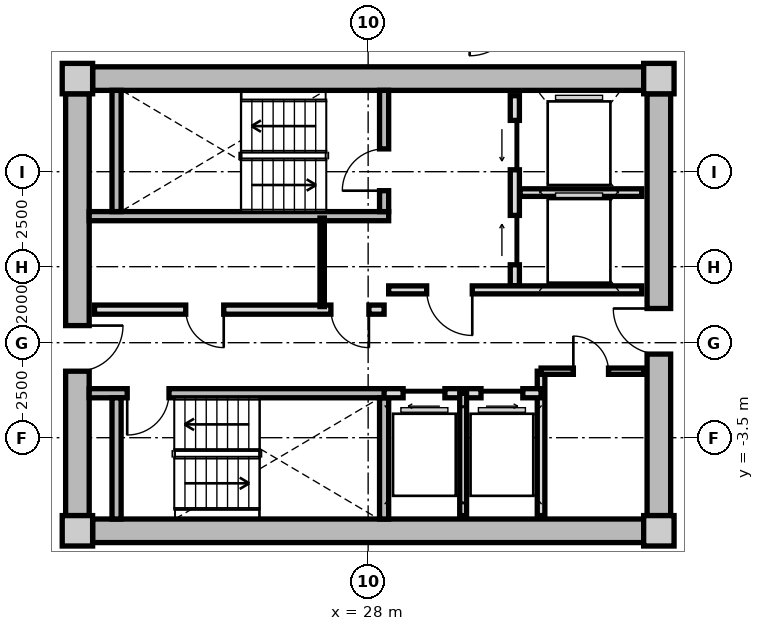
"""IFC4 building model, lengths in metres.
Left out: names, types, materials, properties, quantities, classifications, styles, units other than length and angle.
Written with IfcOpenShell. Run it as: python <this file> out.ifc"""

import sys

from ifc_helpers import new_model, si_unit, direction, frame, frame_2d, origin, origin_2d, place, context, subcontext, project, spatial, rectangle, extrude, source, transform, mapped, element, fill, save


model = new_model("IFC4")
c1 = context("Model", 3, precision=1e-05, world=origin(), true_north=direction((0.0, 1.0)))
c2 = subcontext(c1, "Body", "Model", "MODEL_VIEW")
j1 = project(units=[si_unit("LENGTHUNIT", "METRE"), si_unit("PLANEANGLEUNIT", "RADIAN")], contexts=[c1])
p1 = place(None, origin())
s1 = spatial("IfcSite", under=j1, at=p1, CompositionType="ELEMENT")
p2 = place(p1, origin())
s2 = spatial("IfcBuilding", under=s1, at=p2, CompositionType="ELEMENT")
p3 = place(p2, frame((0.0, 0.0, 155.65)))
s3 = spatial("IfcBuildingStorey", under=s2, at=p3, CompositionType="ELEMENT", Elevation=155.65)
m1 = source(origin(), c2, "Body", "SweptSolid", [
    extrude(rectangle(XDim=0.8, YDim=0.8, at=origin_2d()), origin(), (0.0, 0.0, 1.0), 3.05),
])
for number, where, z_axis, x_axis in (
    (1, (20.35, -5.95, 0.0), (0.0, 0.0, 1.0), (1.0, 0.0, 0.0)),
    (2, (35.65, -5.95, 0.0), (0.0, 0.0, 1.0), (1.0, 0.0, 0.0)),
    (3, (35.65, 5.95, 0.0), (0.0, 0.0, 1.0), (1.0, 0.0, 0.0)),
    (4, (20.35, 5.95, 0.0), (0.0, 0.0, 1.0), (1.0, 0.0, 0.0)),
):
    element("IfcColumn", number, at=place(p3, frame(where, z_axis=z_axis, x_axis=x_axis)), inside=s3, PredefinedType="COLUMN", context=c2, shape_type="MappedRepresentation", body=[
        mapped(m1, transform((0.0, 0.0, 0.0), x_axis=(1.0, 0.0, 0.0), y_axis=(0.0, 1.0, 0.0), z_axis=(0.0, 0.0, 1.0), scale=1.0)),
    ])
m2 = source(origin(), c2, "Body", "SweptSolid", [
    extrude(rectangle(XDim=14.5, YDim=0.62, at=frame_2d((7.25, 0.0))), origin(), (0.0, 0.0, 1.0), 2.81),
])
for number, where, z_axis, x_axis in (
    (5, (20.75, 5.95, 0.0), (0.0, 0.0, 1.0), (1.0, 0.0, 0.0)),
    (6, (35.25, -5.95, 0.0), (0.0, 0.0, 1.0), (-1.0, 0.0, 0.0)),
):
    element("IfcWall", number, at=place(p3, frame(where, z_axis=z_axis, x_axis=x_axis)), inside=s3, PredefinedType="SHEAR", context=c2, shape_type="MappedRepresentation", body=[
        mapped(m2, transform((0.0, 0.0, 0.0), x_axis=(1.0, 0.0, 0.0), y_axis=(0.0, 1.0, 0.0), z_axis=(0.0, 0.0, 1.0), scale=1.0)),
    ])
m3 = source(origin(), c2, "Body", "SweptSolid", [
    extrude(rectangle(XDim=11.1, YDim=0.62, at=frame_2d((5.55, 0.0))), origin(), (0.0, 0.0, 1.0), 2.81),
])
p4 = place(p3, frame((20.35, -5.55, 0.0), z_axis=(0.0, 0.0, 1.0), x_axis=(0.0, 1.0, 0.0)))
e7 = element("IfcWall", 7, at=p4, inside=s3, PredefinedType="SHEAR", context=c2, shape_type="MappedRepresentation", body=[
    mapped(m3, transform((0.0, 0.0, 0.0), x_axis=(1.0, 0.0, 0.0), y_axis=(0.0, 1.0, 0.0), z_axis=(0.0, 0.0, 1.0), scale=1.0)),
])
p5 = place(p4, frame((3.8, 0.0, 0.0)))
e8 = element("IfcOpeningElement", 8, at=p5, cuts=e7, PredefinedType="OPENING", context=c2, shape_type="SweptSolid", body=[
    extrude(rectangle(XDim=1.2, YDim=2.15, at=frame_2d((0.6, 1.075))), frame((0.0, 0.32, 0.0), z_axis=(0.0, -1.0, 0.0), x_axis=(1.0, 0.0, 0.0)), (0.0, 0.0, 1.0), 0.64),
])
p6 = place(p3, frame((35.65, 5.55, 0.0), z_axis=(0.0, 0.0, 1.0), x_axis=(0.0, -1.0, 0.0)))
e9 = element("IfcWall", 9, at=p6, inside=s3, PredefinedType="SHEAR", context=c2, shape_type="MappedRepresentation", body=[
    mapped(m3, transform((0.0, 0.0, 0.0), x_axis=(1.0, 0.0, 0.0), y_axis=(0.0, 1.0, 0.0), z_axis=(0.0, 0.0, 1.0), scale=1.0)),
])
p7 = place(p6, frame((5.65, 0.0, 0.0)))
e10 = element("IfcOpeningElement", 10, at=p7, cuts=e9, PredefinedType="OPENING", context=c2, shape_type="SweptSolid", body=[
    extrude(rectangle(XDim=1.2, YDim=2.15, at=frame_2d((0.6, 1.075))), frame((0.0, 0.32, 0.0), z_axis=(0.0, -1.0, 0.0), x_axis=(1.0, 0.0, 0.0)), (0.0, 0.0, 1.0), 0.64),
])
m4 = source(origin(), c2, "Body", "SweptSolid", [
    extrude(rectangle(XDim=7.88, YDim=0.24, at=frame_2d((3.94, 0.0))), origin(), (0.0, 0.0, 1.0), 2.81),
])
p8 = place(p3, frame((20.66, 2.33, 0.0), z_axis=(0.0, 0.0, 1.0), x_axis=(1.0, 0.0, 0.0)))
e11 = element("IfcWall", 11, at=p8, inside=s3, PredefinedType="PARTITIONING", context=c2, shape_type="MappedRepresentation", body=[
    mapped(m4, transform((0.0, 0.0, 0.0), x_axis=(1.0, 0.0, 0.0), y_axis=(0.0, 1.0, 0.0), z_axis=(0.0, 0.0, 1.0), scale=1.0)),
])
m5 = source(origin(), c2, "Body", "SweptSolid", [
    extrude(rectangle(XDim=3.19, YDim=0.24, at=frame_2d((1.595, 0.0))), origin(), (0.0, 0.0, 1.0), 2.81),
])
p9 = place(p3, frame((21.38, 2.45, 0.0), z_axis=(0.0, 0.0, 1.0), x_axis=(0.0, 1.0, 0.0)))
e12 = element("IfcWall", 12, at=p9, inside=s3, PredefinedType="PARTITIONING", context=c2, shape_type="MappedRepresentation", body=[
    mapped(m5, transform((0.0, 0.0, 0.0), x_axis=(1.0, 0.0, 0.0), y_axis=(0.0, 1.0, 0.0), z_axis=(0.0, 0.0, 1.0), scale=1.0)),
])
p10 = place(p3, frame((28.42, 2.45, 0.0), z_axis=(0.0, 0.0, 1.0), x_axis=(0.0, 1.0, 0.0)))
e13 = element("IfcWall", 13, at=p10, inside=s3, PredefinedType="PARTITIONING", context=c2, shape_type="MappedRepresentation", body=[
    mapped(m5, transform((0.0, 0.0, 0.0), x_axis=(1.0, 0.0, 0.0), y_axis=(0.0, 1.0, 0.0), z_axis=(0.0, 0.0, 1.0), scale=1.0)),
])
p11 = place(p10, frame((0.55, 0.0, 0.0)))
e14 = element("IfcOpeningElement", 14, at=p11, cuts=e13, PredefinedType="OPENING", context=c2, shape_type="SweptSolid", body=[
    extrude(rectangle(XDim=1.1, YDim=2.15, at=frame_2d((0.55, 1.075))), frame((0.0, 0.13, 0.0), z_axis=(0.0, -1.0, 0.0), x_axis=(1.0, 0.0, 0.0)), (0.0, 0.0, 1.0), 0.26),
])
p12 = place(p3, frame((20.66, -2.33, 0.0), z_axis=(0.0, 0.0, 1.0), x_axis=(1.0, 0.0, 0.0)))
e15 = element("IfcWall", 15, at=p12, inside=s3, PredefinedType="PARTITIONING", context=c2, shape_type="MappedRepresentation", body=[
    mapped(m4, transform((0.0, 0.0, 0.0), x_axis=(1.0, 0.0, 0.0), y_axis=(0.0, 1.0, 0.0), z_axis=(0.0, 0.0, 1.0), scale=1.0)),
])
p13 = place(p12, frame((1.0, 0.0, 0.0)))
e16 = element("IfcOpeningElement", 16, at=p13, cuts=e15, PredefinedType="OPENING", context=c2, shape_type="SweptSolid", body=[
    extrude(rectangle(XDim=1.1, YDim=2.15, at=frame_2d((0.55, 1.075))), frame((0.0, 0.13, 0.0), z_axis=(0.0, -1.0, 0.0), x_axis=(1.0, 0.0, 0.0)), (0.0, 0.0, 1.0), 0.26),
])
for number, where, z_axis, x_axis in (
    (17, (21.38, -5.64, 0.0), (0.0, 0.0, 1.0), (0.0, 1.0, 0.0)),
    (18, (28.42, -5.64, 0.0), (0.0, 0.0, 1.0), (0.0, 1.0, 0.0)),
):
    element("IfcWall", number, at=place(p3, frame(where, z_axis=z_axis, x_axis=x_axis)), inside=s3, PredefinedType="PARTITIONING", context=c2, shape_type="MappedRepresentation", body=[
        mapped(m5, transform((0.0, 0.0, 0.0), x_axis=(1.0, 0.0, 0.0), y_axis=(0.0, 1.0, 0.0), z_axis=(0.0, 0.0, 1.0), scale=1.0)),
    ])
m6 = source(origin(), c2, "Body", "SweptSolid", [
    extrude(rectangle(XDim=5.0, YDim=0.24, at=frame_2d((2.5, 0.0))), origin(), (0.0, 0.0, 1.0), 2.795),
])
p14 = place(p3, frame((31.86, 0.5, 0.0), z_axis=(0.0, 0.0, 1.0), x_axis=(0.0, 1.0, 0.0)))
e19 = element("IfcWall", 19, at=p14, inside=s3, PredefinedType="PARTITIONING", context=c2, shape_type="MappedRepresentation", body=[
    mapped(m6, transform((0.0, 0.0, 0.0), x_axis=(1.0, 0.0, 0.0), y_axis=(0.0, 1.0, 0.0), z_axis=(0.0, 0.0, 1.0), scale=1.0)),
])
p15 = place(p14, frame((3.05, 0.0, 0.0)))
e20 = element("IfcOpeningElement", 20, at=p15, cuts=e19, PredefinedType="OPENING", context=c2, shape_type="SweptSolid", body=[
    extrude(rectangle(XDim=1.3, YDim=2.2, at=frame_2d((0.65, 1.1))), frame((0.0, 0.13, 0.0), z_axis=(0.0, -1.0, 0.0), x_axis=(1.0, 0.0, 0.0)), (0.0, 0.0, 1.0), 0.26),
])
p16 = place(p14, frame((0.55, 0.0, 0.0)))
e21 = element("IfcOpeningElement", 21, at=p16, cuts=e19, PredefinedType="OPENING", context=c2, shape_type="SweptSolid", body=[
    extrude(rectangle(XDim=1.3, YDim=2.2, at=frame_2d((0.65, 1.1))), frame((0.0, 0.13, 0.0), z_axis=(0.0, -1.0, 0.0), x_axis=(1.0, 0.0, 0.0)), (0.0, 0.0, 1.0), 0.26),
])
m7 = source(origin(), c2, "Body", "SweptSolid", [
    extrude(rectangle(XDim=3.2, YDim=0.2, at=frame_2d((1.6, 0.0))), origin(), (0.0, 0.0, 1.0), 2.795),
])
p17 = place(p3, frame((32.0, 2.95, 0.0), z_axis=(0.0, 0.0, 1.0), x_axis=(1.0, 0.0, 0.0)))
e22 = element("IfcWall", 22, at=p17, inside=s3, PredefinedType="PARTITIONING", context=c2, shape_type="MappedRepresentation", body=[
    mapped(m7, transform((0.0, 0.0, 0.0), x_axis=(1.0, 0.0, 0.0), y_axis=(0.0, 1.0, 0.0), z_axis=(0.0, 0.0, 1.0), scale=1.0)),
])
m8 = source(origin(), c2, "Body", "SweptSolid", [
    extrude(rectangle(XDim=6.66, YDim=0.21, at=frame_2d((3.33, 0.0))), origin(), (0.0, 0.0, 1.0), 2.795),
])
p18 = place(p3, frame((28.54, 0.39, 0.0), z_axis=(0.0, 0.0, 1.0), x_axis=(1.0, 0.0, 0.0)))
e23 = element("IfcWall", 23, at=p18, inside=s3, PredefinedType="PARTITIONING", context=c2, shape_type="MappedRepresentation", body=[
    mapped(m8, transform((0.0, 0.0, 0.0), x_axis=(1.0, 0.0, 0.0), y_axis=(0.0, 1.0, 0.0), z_axis=(0.0, 0.0, 1.0), scale=1.0)),
])
p19 = place(p18, frame((1.0, 0.0, 0.0)))
e24 = element("IfcOpeningElement", 24, at=p19, cuts=e23, PredefinedType="OPENING", context=c2, shape_type="SweptSolid", body=[
    extrude(rectangle(XDim=1.2, YDim=2.15, at=frame_2d((0.6, 1.075))), frame((0.0, 0.115, 0.0), z_axis=(0.0, -1.0, 0.0), x_axis=(1.0, 0.0, 0.0)), (0.0, 0.0, 1.0), 0.23),
])
m9 = source(origin(), c2, "Body", "SweptSolid", [
    extrude(rectangle(XDim=7.62, YDim=0.24, at=frame_2d((3.81, 0.0))), origin(), (0.0, 0.0, 1.0), 2.795),
])
p20 = place(p3, frame((20.8, -0.13, 0.0), z_axis=(0.0, 0.0, 1.0), x_axis=(1.0, 0.0, 0.0)))
e25 = element("IfcWall", 25, at=p20, inside=s3, PredefinedType="PARTITIONING", context=c2, shape_type="MappedRepresentation", body=[
    mapped(m9, transform((0.0, 0.0, 0.0), x_axis=(1.0, 0.0, 0.0), y_axis=(0.0, 1.0, 0.0), z_axis=(0.0, 0.0, 1.0), scale=1.0)),
])
p21 = place(p20, frame((6.22, 0.0, 0.0)))
e26 = element("IfcOpeningElement", 26, at=p21, cuts=e25, PredefinedType="OPENING", context=c2, shape_type="SweptSolid", body=[
    extrude(rectangle(XDim=1.0, YDim=2.1, at=frame_2d((0.5, 1.05))), frame((0.0, 0.13, 0.0), z_axis=(0.0, -1.0, 0.0), x_axis=(1.0, 0.0, 0.0)), (0.0, 0.0, 1.0), 0.26),
])
p22 = place(p20, frame((2.4, 0.0, 0.0)))
e27 = element("IfcOpeningElement", 27, at=p22, cuts=e25, PredefinedType="OPENING", context=c2, shape_type="SweptSolid", body=[
    extrude(rectangle(XDim=1.0, YDim=2.1, at=frame_2d((0.5, 1.05))), frame((0.0, 0.13, 0.0), z_axis=(0.0, -1.0, 0.0), x_axis=(1.0, 0.0, 0.0)), (0.0, 0.0, 1.0), 0.26),
])
m10 = source(origin(), c2, "Body", "SweptSolid", [
    extrude(rectangle(XDim=2.33, YDim=0.115, at=frame_2d((1.165, 0.0))), origin(), (0.0, 0.0, 1.0), 2.795),
])
p23 = place(p3, frame((26.79, -0.05, 0.0), z_axis=(0.0, 0.0, 1.0), x_axis=(0.0, 1.0, 0.0)))
e28 = element("IfcWall", 28, at=p23, inside=s3, PredefinedType="PARTITIONING", context=c2, shape_type="MappedRepresentation", body=[
    mapped(m10, transform((0.0, 0.0, 0.0), x_axis=(1.0, 0.0, 0.0), y_axis=(0.0, 1.0, 0.0), z_axis=(0.0, 0.0, 1.0), scale=1.0)),
])
m11 = source(origin(), c2, "Body", "SweptSolid", [
    extrude(rectangle(XDim=3.8, YDim=0.2, at=frame_2d((1.9, 0.0))), origin(), (0.0, 0.0, 1.0), 2.795),
])
p24 = place(p3, frame((32.55, -5.55, 0.0), z_axis=(0.0, 0.0, 1.0), x_axis=(0.0, 1.0, 0.0)))
e29 = element("IfcWall", 29, at=p24, inside=s3, PredefinedType="PARTITIONING", context=c2, shape_type="MappedRepresentation", body=[
    mapped(m11, transform((0.0, 0.0, 0.0), x_axis=(1.0, 0.0, 0.0), y_axis=(0.0, 1.0, 0.0), z_axis=(0.0, 0.0, 1.0), scale=1.0)),
])
m12 = source(origin(), c2, "Body", "SweptSolid", [
    extrude(rectangle(XDim=4.13, YDim=0.24, at=frame_2d((2.065, 0.0))), origin(), (0.0, 0.0, 1.0), 2.795),
])
p25 = place(p3, frame((28.42, -2.33, 0.0), z_axis=(0.0, 0.0, 1.0), x_axis=(1.0, 0.0, 0.0)))
e30 = element("IfcWall", 30, at=p25, inside=s3, PredefinedType="PARTITIONING", context=c2, shape_type="MappedRepresentation", body=[
    mapped(m12, transform((0.0, 0.0, 0.0), x_axis=(1.0, 0.0, 0.0), y_axis=(0.0, 1.0, 0.0), z_axis=(0.0, 0.0, 1.0), scale=1.0)),
])
p26 = place(p25, frame((0.5, 0.0, 0.0)))
e31 = element("IfcOpeningElement", 31, at=p26, cuts=e30, PredefinedType="OPENING", context=c2, shape_type="SweptSolid", body=[
    extrude(rectangle(XDim=1.1, YDim=2.2, at=frame_2d((0.55, 1.1))), frame((0.0, 0.13, 0.0), z_axis=(0.0, -1.0, 0.0), x_axis=(1.0, 0.0, 0.0)), (0.0, 0.0, 1.0), 0.26),
])
p27 = place(p25, frame((2.55, 0.0, 0.0)))
e32 = element("IfcOpeningElement", 32, at=p27, cuts=e30, PredefinedType="OPENING", context=c2, shape_type="SweptSolid", body=[
    extrude(rectangle(XDim=1.1, YDim=2.2, at=frame_2d((0.55, 1.1))), frame((0.0, 0.13, 0.0), z_axis=(0.0, -1.0, 0.0), x_axis=(1.0, 0.0, 0.0)), (0.0, 0.0, 1.0), 0.26),
])
m13 = source(origin(), c2, "Body", "SweptSolid", [
    extrude(rectangle(XDim=3.22, YDim=0.18, at=frame_2d((1.61, 0.0))), origin(), (0.0, 0.0, 1.0), 2.795),
])
p28 = place(p3, frame((30.5, -5.55, 0.0), z_axis=(0.0, 0.0, 1.0), x_axis=(0.0, 1.0, 0.0)))
e33 = element("IfcWall", 33, at=p28, inside=s3, PredefinedType="PARTITIONING", context=c2, shape_type="MappedRepresentation", body=[
    mapped(m13, transform((0.0, 0.0, 0.0), x_axis=(1.0, 0.0, 0.0), y_axis=(0.0, 1.0, 0.0), z_axis=(0.0, 0.0, 1.0), scale=1.0)),
])
m14 = source(origin(), c2, "Body", "SweptSolid", [
    extrude(rectangle(XDim=2.7, YDim=0.165, at=frame_2d((1.35, 0.0))), origin(), (0.0, 0.0, 1.0), 2.795),
])
p29 = place(p3, frame((32.55, -1.75, 0.0), z_axis=(0.0, 0.0, 1.0), x_axis=(1.0, 0.0, 0.0)))
e34 = element("IfcWall", 34, at=p29, inside=s3, PredefinedType="PARTITIONING", context=c2, shape_type="MappedRepresentation", body=[
    mapped(m14, transform((0.0, 0.0, 0.0), x_axis=(1.0, 0.0, 0.0), y_axis=(0.0, 1.0, 0.0), z_axis=(0.0, 0.0, 1.0), scale=1.0)),
])
p30 = place(p29, frame((0.85, 0.0, 0.0)))
e35 = element("IfcOpeningElement", 35, at=p30, cuts=e34, PredefinedType="OPENING", context=c2, shape_type="SweptSolid", body=[
    extrude(rectangle(XDim=0.925, YDim=2.1, at=frame_2d((0.462, 1.05))), frame((0.0, 0.093, 0.0), z_axis=(0.0, -1.0, 0.0), x_axis=(1.0, 0.0, 0.0)), (0.0, 0.0, 1.0), 0.185),
])
m15 = source(origin(), c2, "Body", "SweptSolid", [
    extrude(rectangle(XDim=1.1, YDim=2.15, at=frame_2d((0.55, 1.075))), frame((0.0, 0.025, 0.0), z_axis=(0.0, -1.0, 0.0), x_axis=(1.0, 0.0, 0.0)), (0.0, 0.0, 1.0), 0.05),
])
p31 = place(p11, origin())
e36 = element("IfcDoor", 36, at=p31, inside=s3, OperationType="SINGLE_SWING_LEFT", PredefinedType="DOOR", context=c2, shape_type="MappedRepresentation", body=[
    mapped(m15, transform((0.0, 0.0, 0.0), x_axis=(1.0, 0.0, 0.0), y_axis=(0.0, 1.0, 0.0), z_axis=(0.0, 0.0, 1.0), scale=1.0)),
])
fill(e14, e36)
p32 = place(p13, frame((1.1, 0.0, 0.0), z_axis=(0.0, 0.0, 1.0), x_axis=(-1.0, 0.0, 0.0)))
e37 = element("IfcDoor", 37, at=p32, inside=s3, OperationType="SINGLE_SWING_RIGHT", PredefinedType="DOOR", context=c2, shape_type="MappedRepresentation", body=[
    mapped(m15, transform((0.0, 0.0, 0.0), x_axis=(1.0, 0.0, 0.0), y_axis=(0.0, 1.0, 0.0), z_axis=(0.0, 0.0, 1.0), scale=1.0)),
])
fill(e16, e37)
m16 = source(origin(), c2, "Body", "SweptSolid", [
    extrude(rectangle(XDim=1.3, YDim=2.2, at=frame_2d((0.65, 1.1))), frame((0.0, 0.025, 0.0), z_axis=(0.0, -1.0, 0.0), x_axis=(1.0, 0.0, 0.0)), (0.0, 0.0, 1.0), 0.05),
])
p33 = place(p15, origin())
e38 = element("IfcDoor", 38, at=p33, inside=s3, OperationType="SLIDING_TO_LEFT", PredefinedType="DOOR", context=c2, shape_type="MappedRepresentation", body=[
    mapped(m16, transform((0.0, 0.0, 0.0), x_axis=(1.0, 0.0, 0.0), y_axis=(0.0, 1.0, 0.0), z_axis=(0.0, 0.0, 1.0), scale=1.0)),
])
fill(e20, e38)
p34 = place(p16, origin())
e39 = element("IfcDoor", 39, at=p34, inside=s3, OperationType="SLIDING_TO_RIGHT", PredefinedType="DOOR", context=c2, shape_type="MappedRepresentation", body=[
    mapped(m16, transform((0.0, 0.0, 0.0), x_axis=(1.0, 0.0, 0.0), y_axis=(0.0, 1.0, 0.0), z_axis=(0.0, 0.0, 1.0), scale=1.0)),
])
fill(e21, e39)
m17 = source(origin(), c2, "Body", "SweptSolid", [
    extrude(rectangle(XDim=1.2, YDim=2.15, at=frame_2d((0.6, 1.075))), frame((0.0, 0.025, 0.0), z_axis=(0.0, -1.0, 0.0), x_axis=(1.0, 0.0, 0.0)), (0.0, 0.0, 1.0), 0.05),
])
p35 = place(p19, frame((1.2, 0.0, 0.0), z_axis=(0.0, 0.0, 1.0), x_axis=(-1.0, 0.0, 0.0)))
e40 = element("IfcDoor", 40, at=p35, inside=s3, OperationType="SINGLE_SWING_LEFT", PredefinedType="DOOR", context=c2, shape_type="MappedRepresentation", body=[
    mapped(m17, transform((0.0, 0.0, 0.0), x_axis=(1.0, 0.0, 0.0), y_axis=(0.0, 1.0, 0.0), z_axis=(0.0, 0.0, 1.0), scale=1.0)),
])
fill(e24, e40)
p36 = place(p5, frame((1.2, 0.0, 0.0), z_axis=(0.0, 0.0, 1.0), x_axis=(-1.0, 0.0, 0.0)))
e41 = element("IfcDoor", 41, at=p36, inside=s3, OperationType="SINGLE_SWING_LEFT", PredefinedType="DOOR", context=c2, shape_type="MappedRepresentation", body=[
    mapped(m17, transform((0.0, 0.0, 0.0), x_axis=(1.0, 0.0, 0.0), y_axis=(0.0, 1.0, 0.0), z_axis=(0.0, 0.0, 1.0), scale=1.0)),
])
fill(e8, e41)
p37 = place(p7, frame((1.2, 0.0, 0.0), z_axis=(0.0, 0.0, 1.0), x_axis=(-1.0, 0.0, 0.0)))
e42 = element("IfcDoor", 42, at=p37, inside=s3, OperationType="SINGLE_SWING_RIGHT", PredefinedType="DOOR", context=c2, shape_type="MappedRepresentation", body=[
    mapped(m17, transform((0.0, 0.0, 0.0), x_axis=(1.0, 0.0, 0.0), y_axis=(0.0, 1.0, 0.0), z_axis=(0.0, 0.0, 1.0), scale=1.0)),
])
fill(e10, e42)
m18 = source(origin(), c2, "Body", "SweptSolid", [
    extrude(rectangle(XDim=1.0, YDim=2.1, at=frame_2d((0.5, 1.05))), frame((0.0, 0.025, 0.0), z_axis=(0.0, -1.0, 0.0), x_axis=(1.0, 0.0, 0.0)), (0.0, 0.0, 1.0), 0.05),
])
p38 = place(p21, frame((1.0, 0.0, 0.0), z_axis=(0.0, 0.0, 1.0), x_axis=(-1.0, 0.0, 0.0)))
e43 = element("IfcDoor", 43, at=p38, inside=s3, OperationType="SINGLE_SWING_LEFT", PredefinedType="DOOR", context=c2, shape_type="MappedRepresentation", body=[
    mapped(m18, transform((0.0, 0.0, 0.0), x_axis=(1.0, 0.0, 0.0), y_axis=(0.0, 1.0, 0.0), z_axis=(0.0, 0.0, 1.0), scale=1.0)),
])
fill(e26, e43)
p39 = place(p22, frame((1.0, 0.0, 0.0), z_axis=(0.0, 0.0, 1.0), x_axis=(-1.0, 0.0, 0.0)))
e44 = element("IfcDoor", 44, at=p39, inside=s3, OperationType="SINGLE_SWING_LEFT", PredefinedType="DOOR", context=c2, shape_type="MappedRepresentation", body=[
    mapped(m18, transform((0.0, 0.0, 0.0), x_axis=(1.0, 0.0, 0.0), y_axis=(0.0, 1.0, 0.0), z_axis=(0.0, 0.0, 1.0), scale=1.0)),
])
fill(e27, e44)
m19 = source(origin(), c2, "Body", "SweptSolid", [
    extrude(rectangle(XDim=1.1, YDim=2.2, at=frame_2d((0.55, 1.1))), frame((0.0, 0.025, 0.0), z_axis=(0.0, -1.0, 0.0), x_axis=(1.0, 0.0, 0.0)), (0.0, 0.0, 1.0), 0.05),
])
p40 = place(p26, frame((1.1, 0.0, 0.0), z_axis=(0.0, 0.0, 1.0), x_axis=(-1.0, 0.0, 0.0)))
e45 = element("IfcDoor", 45, at=p40, inside=s3, OperationType="SLIDING_TO_LEFT", PredefinedType="DOOR", context=c2, shape_type="MappedRepresentation", body=[
    mapped(m19, transform((0.0, 0.0, 0.0), x_axis=(1.0, 0.0, 0.0), y_axis=(0.0, 1.0, 0.0), z_axis=(0.0, 0.0, 1.0), scale=1.0)),
])
fill(e31, e45)
p41 = place(p27, frame((1.1, 0.0, 0.0), z_axis=(0.0, 0.0, 1.0), x_axis=(-1.0, 0.0, 0.0)))
e46 = element("IfcDoor", 46, at=p41, inside=s3, OperationType="SLIDING_TO_RIGHT", PredefinedType="DOOR", context=c2, shape_type="MappedRepresentation", body=[
    mapped(m19, transform((0.0, 0.0, 0.0), x_axis=(1.0, 0.0, 0.0), y_axis=(0.0, 1.0, 0.0), z_axis=(0.0, 0.0, 1.0), scale=1.0)),
])
fill(e32, e46)
m20 = source(origin(), c2, "Body", "SweptSolid", [
    extrude(rectangle(XDim=0.925, YDim=2.1, at=frame_2d((0.462, 1.05))), frame((0.0, 0.025, 0.0), z_axis=(0.0, -1.0, 0.0), x_axis=(1.0, 0.0, 0.0)), (0.0, 0.0, 1.0), 0.05),
])
p42 = place(p30, origin())
e47 = element("IfcDoor", 47, at=p42, inside=s3, OperationType="SINGLE_SWING_LEFT", PredefinedType="DOOR", context=c2, shape_type="MappedRepresentation", body=[
    mapped(m20, transform((0.0, 0.0, 0.0), x_axis=(1.0, 0.0, 0.0), y_axis=(0.0, 1.0, 0.0), z_axis=(0.0, 0.0, 1.0), scale=1.0)),
])
fill(e35, e47)
save(model, sys.argv[1])
